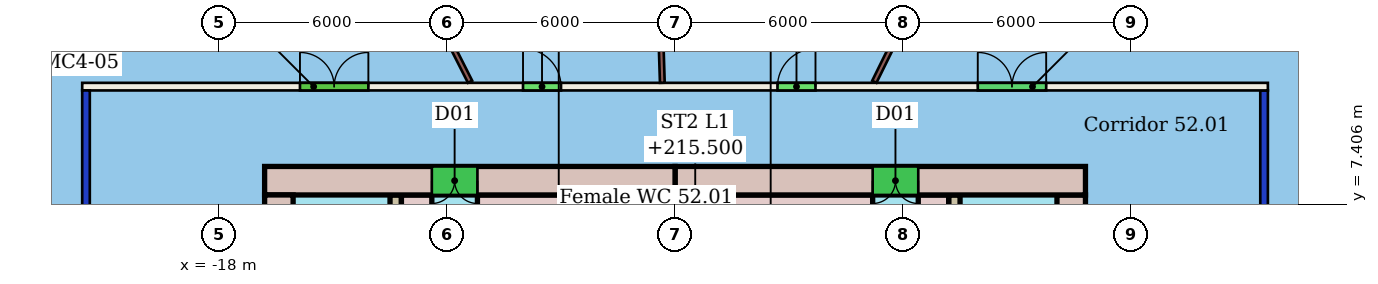
"""IFC4 building model, lengths in metres.
Left out: names, types, materials, properties, quantities, classifications, styles, units other than length and angle.
Written with IfcOpenShell. Run it as: python <this file> out.ifc"""

import sys

from ifc_helpers import new_model, si_unit, direction, frame, frame_2d, origin, place, context, subcontext, project, spatial, rectangle, extrude, element, fill, save


model = new_model("IFC4")
c1 = context("Model", 3, precision=1e-05, world=origin(), true_north=direction((0.0, 1.0)))
c2 = subcontext(c1, "Body", "Model", "MODEL_VIEW")
j1 = project(units=[si_unit("LENGTHUNIT", "METRE"), si_unit("PLANEANGLEUNIT", "RADIAN")], contexts=[c1])
p1 = place(None, origin())
s1 = spatial("IfcSite", under=j1, at=p1, CompositionType="ELEMENT")
p2 = place(p1, origin())
s2 = spatial("IfcBuilding", under=s1, at=p2, CompositionType="ELEMENT")
p3 = place(p2, frame((0.0, 0.0, 213.7)))
s3 = spatial("IfcBuildingStorey", under=s2, at=p3, CompositionType="ELEMENT", Elevation=213.7)
p4 = place(p3, frame((-21.5, -10.4, 0.0), z_axis=(0.0, 0.0, 1.0), x_axis=(0.0, 1.0, 0.0)))
e1 = element("IfcWall", 1, at=p4, inside=s3, PredefinedType="PARTITIONING", context=c2, shape_type="SweptSolid", body=[
    extrude(rectangle(XDim=20.8, YDim=0.2, at=frame_2d((10.4, 0.0))), origin(), (0.0, 0.0, 1.0), 3.05),
])
p5 = place(p4, frame((6.094, 0.0, 0.0)))
e2 = element("IfcOpeningElement", 2, at=p5, cuts=e1, PredefinedType="OPENING", context=c2, shape_type="SweptSolid", body=[
    extrude(rectangle(XDim=1.8, YDim=2.1, at=frame_2d((0.9, 1.05))), frame((0.0, 0.11, 0.0), z_axis=(0.0, -1.0, 0.0), x_axis=(1.0, 0.0, 0.0)), (0.0, 0.0, 1.0), 0.22),
])
p6 = place(p3, frame((-21.6, 10.5, 0.0), z_axis=(0.0, 0.0, 1.0), x_axis=(1.0, 0.0, 0.0)))
e3 = element("IfcWall", 3, at=p6, inside=s3, PredefinedType="PARTITIONING", context=c2, shape_type="SweptSolid", body=[
    extrude(rectangle(XDim=31.2, YDim=0.2, at=frame_2d((15.6, 0.0))), origin(), (0.0, 0.0, 1.0), 3.45),
])
p7 = place(p6, frame((18.296, 0.0, 0.0)))
e4 = element("IfcOpeningElement", 4, at=p7, cuts=e3, PredefinedType="OPENING", context=c2, shape_type="SweptSolid", body=[
    extrude(rectangle(XDim=1.0, YDim=2.4, at=frame_2d((0.5, 1.2))), frame((0.0, 0.11, 0.0), z_axis=(0.0, -1.0, 0.0), x_axis=(1.0, 0.0, 0.0)), (0.0, 0.0, 1.0), 0.22),
])
p8 = place(p6, frame((11.6, 0.0, 0.0)))
e5 = element("IfcOpeningElement", 5, at=p8, cuts=e3, PredefinedType="OPENING", context=c2, shape_type="SweptSolid", body=[
    extrude(rectangle(XDim=1.0, YDim=2.4, at=frame_2d((0.5, 1.2))), frame((0.0, 0.11, 0.0), z_axis=(0.0, -1.0, 0.0), x_axis=(1.0, 0.0, 0.0)), (0.0, 0.0, 1.0), 0.22),
])
p9 = place(p6, frame((5.73, 0.0, 0.0)))
e6 = element("IfcOpeningElement", 6, at=p9, cuts=e3, PredefinedType="OPENING", context=c2, shape_type="SweptSolid", body=[
    extrude(rectangle(XDim=1.8, YDim=2.4, at=frame_2d((0.9, 1.2))), frame((0.0, 0.11, 0.0), z_axis=(0.0, -1.0, 0.0), x_axis=(1.0, 0.0, 0.0)), (0.0, 0.0, 1.0), 0.22),
])
p10 = place(p6, frame((23.566, 0.0, 0.0)))
e7 = element("IfcOpeningElement", 7, at=p10, cuts=e3, PredefinedType="OPENING", context=c2, shape_type="SweptSolid", body=[
    extrude(rectangle(XDim=1.8, YDim=2.1, at=frame_2d((0.9, 1.05))), frame((0.0, 0.11, 0.0), z_axis=(0.0, -1.0, 0.0), x_axis=(1.0, 0.0, 0.0)), (0.0, 0.0, 1.0), 0.22),
])
p11 = place(p3, frame((9.5, 10.4, 0.0), z_axis=(0.0, 0.0, 1.0), x_axis=(0.0, -1.0, 0.0)))
e8 = element("IfcWall", 8, at=p11, inside=s3, PredefinedType="PARTITIONING", context=c2, shape_type="SweptSolid", body=[
    extrude(rectangle(XDim=20.8, YDim=0.2, at=frame_2d((10.4, 0.0))), origin(), (0.0, 0.0, 1.0), 3.05),
])
p12 = place(p11, frame((17.01, 0.0, 0.0)))
e9 = element("IfcOpeningElement", 9, at=p12, cuts=e8, PredefinedType="OPENING", context=c2, shape_type="SweptSolid", body=[
    extrude(rectangle(XDim=1.0, YDim=2.4, at=frame_2d((0.5, 1.2))), frame((0.0, 0.11, 0.0), z_axis=(0.0, -1.0, 0.0), x_axis=(1.0, 0.0, 0.0)), (0.0, 0.0, 1.0), 0.22),
])
p13 = place(p11, frame((11.015, 0.0, 0.0)))
e10 = element("IfcOpeningElement", 10, at=p13, cuts=e8, PredefinedType="OPENING", context=c2, shape_type="SweptSolid", body=[
    extrude(rectangle(XDim=1.5, YDim=2.1, at=frame_2d((0.75, 1.05))), frame((0.0, 0.11, 0.0), z_axis=(0.0, -1.0, 0.0), x_axis=(1.0, 0.0, 0.0)), (0.0, 0.0, 1.0), 0.22),
])
p14 = place(p3, frame((5.603, 23.515, 0.0), z_axis=(0.0, 0.0, 1.0), x_axis=(-0.442477794817, -0.896779460678, 0.0)))
e11 = element("IfcWall", 11, at=p14, inside=s3, PredefinedType="PARTITIONING", context=c2, shape_type="SweptSolid", body=[
    extrude(rectangle(XDim=14.371, YDim=0.125, at=frame_2d((7.186, 0.0))), origin(), (0.0, 0.0, 1.0), 3.45),
])
p15 = place(p3, frame((-6.754, 23.892, 0.0), z_axis=(0.0, 0.0, 1.0), x_axis=(0.031543712499, -0.999502373285, 0.0)))
e12 = element("IfcWall", 12, at=p15, inside=s3, PredefinedType="PARTITIONING", context=c2, shape_type="SweptSolid", body=[
    extrude(rectangle(XDim=13.297, YDim=0.125, at=frame_2d((6.648, 0.0))), origin(), (0.0, 0.0, 1.0), 3.45),
])
p16 = place(p3, frame((-16.099, 19.903, 0.0), z_axis=(0.0, 0.0, 1.0), x_axis=(0.452483019346, -0.891773018881, 0.0)))
e13 = element("IfcWall", 13, at=p16, inside=s3, PredefinedType="PARTITIONING", context=c2, shape_type="SweptSolid", body=[
    extrude(rectangle(XDim=10.4, YDim=0.125, at=frame_2d((5.2, 0.0))), origin(), (0.0, 0.0, 1.0), 3.45),
])
p17 = place(p3, frame((18.197, 8.789, 0.0), z_axis=(0.0, 0.0, 1.0), x_axis=(-0.939914460754, -0.341410026896, 0.0)))
e14 = element("IfcWall", 14, at=p17, inside=s3, PredefinedType="PARTITIONING", context=c2, shape_type="SweptSolid", body=[
    extrude(rectangle(XDim=9.124, YDim=0.125, at=frame_2d((4.562, 0.0))), origin(), (0.0, 0.0, 1.0), 3.45),
])
p18 = place(p3, frame((4.8, 8.025, 0.0), z_axis=(0.0, 0.0, 1.0), x_axis=(-1.0, 0.0, 0.0)))
e15 = element("IfcWall", 15, at=p18, inside=s3, PredefinedType="SHEAR", context=c2, shape_type="SweptSolid", body=[
    extrude(rectangle(XDim=10.8, YDim=0.75, at=frame_2d((5.4, 0.0))), origin(), (0.0, 0.0, 1.0), 3.3),
])
p19 = place(p18, frame((4.4, 0.0, 0.0)))
e16 = element("IfcOpeningElement", 16, at=p19, cuts=e15, PredefinedType="OPENING", context=c2, shape_type="SweptSolid", body=[
    extrude(rectangle(XDim=1.2, YDim=2.1, at=frame_2d((0.6, 1.05))), frame((0.0, 0.385, 0.0), z_axis=(0.0, -1.0, 0.0), x_axis=(1.0, 0.0, 0.0)), (0.0, 0.0, 1.0), 0.77),
])
p20 = place(p3, frame((-6.0, 8.025, 0.0), z_axis=(0.0, 0.0, 1.0), x_axis=(-1.0, 0.0, 0.0)))
e17 = element("IfcWall", 17, at=p20, inside=s3, PredefinedType="SHEAR", context=c2, shape_type="SweptSolid", body=[
    extrude(rectangle(XDim=10.8, YDim=0.75, at=frame_2d((5.4, 0.0))), origin(), (0.0, 0.0, 1.0), 3.3),
])
p21 = place(p20, frame((5.2, 0.0, 0.0)))
e18 = element("IfcOpeningElement", 18, at=p21, cuts=e17, PredefinedType="OPENING", context=c2, shape_type="SweptSolid", body=[
    extrude(rectangle(XDim=1.2, YDim=2.1, at=frame_2d((0.6, 1.05))), frame((0.0, 0.385, 0.0), z_axis=(0.0, -1.0, 0.0), x_axis=(1.0, 0.0, 0.0)), (0.0, 0.0, 1.0), 0.77),
])
p22 = place(p3, frame((-16.425, 7.65, 0.0), z_axis=(0.0, 0.0, 1.0), x_axis=(0.0, -1.0, 0.0)))
e19 = element("IfcWall", 19, at=p22, inside=s3, PredefinedType="SHEAR", context=c2, shape_type="SweptSolid", body=[
    extrude(rectangle(XDim=15.3, YDim=0.75, at=frame_2d((7.65, 0.0))), origin(), (0.0, 0.0, 1.0), 3.3),
])
p23 = place(p22, frame((11.25, 0.0, 0.0)))
e20 = element("IfcOpeningElement", 20, at=p23, cuts=e19, PredefinedType="OPENING", context=c2, shape_type="SweptSolid", body=[
    extrude(rectangle(XDim=1.2, YDim=2.1, at=frame_2d((0.6, 1.05))), frame((0.0, 0.385, 0.0), z_axis=(0.0, -1.0, 0.0), x_axis=(1.0, 0.0, 0.0)), (0.0, 0.0, 1.0), 0.77),
])
p24 = place(p22, frame((2.85, 0.0, 0.0)))
e21 = element("IfcOpeningElement", 21, at=p24, cuts=e19, PredefinedType="OPENING", context=c2, shape_type="SweptSolid", body=[
    extrude(rectangle(XDim=1.2, YDim=2.1, at=frame_2d((0.6, 1.05))), frame((0.0, 0.385, 0.0), z_axis=(0.0, -1.0, 0.0), x_axis=(1.0, 0.0, 0.0)), (0.0, 0.0, 1.0), 0.77),
])
p25 = place(p3, frame((4.425, -7.65, 0.0), z_axis=(0.0, 0.0, 1.0), x_axis=(0.0, 1.0, 0.0)))
e22 = element("IfcWall", 22, at=p25, inside=s3, PredefinedType="SHEAR", context=c2, shape_type="SweptSolid", body=[
    extrude(rectangle(XDim=15.3, YDim=0.75, at=frame_2d((7.65, 0.0))), origin(), (0.0, 0.0, 1.0), 3.3),
])
p26 = place(p25, frame((2.85, 0.0, 0.0)))
e23 = element("IfcOpeningElement", 23, at=p26, cuts=e22, PredefinedType="OPENING", context=c2, shape_type="SweptSolid", body=[
    extrude(rectangle(XDim=1.2, YDim=2.1, at=frame_2d((0.6, 1.05))), frame((0.0, 0.385, 0.0), z_axis=(0.0, -1.0, 0.0), x_axis=(1.0, 0.0, 0.0)), (0.0, 0.0, 1.0), 0.77),
])
p27 = place(p25, frame((11.25, 0.0, 0.0)))
e24 = element("IfcOpeningElement", 24, at=p27, cuts=e22, PredefinedType="OPENING", context=c2, shape_type="SweptSolid", body=[
    extrude(rectangle(XDim=1.2, YDim=2.1, at=frame_2d((0.6, 1.05))), frame((0.0, 0.385, 0.0), z_axis=(0.0, -1.0, 0.0), x_axis=(1.0, 0.0, 0.0)), (0.0, 0.0, 1.0), 0.77),
])
p28 = place(p3, frame((-13.35, 7.65, 0.0), z_axis=(0.0, 0.0, 1.0), x_axis=(0.0, -1.0, 0.0)))
e25 = element("IfcWall", 25, at=p28, inside=s3, PredefinedType="SHEAR", context=c2, shape_type="SweptSolid", body=[
    extrude(rectangle(XDim=15.3, YDim=0.3, at=frame_2d((7.65, 0.0))), origin(), (0.0, 0.0, 1.0), 3.3),
])
p29 = place(p28, frame((6.9, 0.0, 0.0)))
e26 = element("IfcOpeningElement", 26, at=p29, cuts=e25, PredefinedType="OPENING", context=c2, shape_type="SweptSolid", body=[
    extrude(rectangle(XDim=1.5, YDim=2.1, at=frame_2d((0.75, 1.05))), frame((0.0, 0.16, 0.0), z_axis=(0.0, -1.0, 0.0), x_axis=(1.0, 0.0, 0.0)), (0.0, 0.0, 1.0), 0.32),
])
p30 = place(p3, frame((1.35, -7.65, 0.0), z_axis=(0.0, 0.0, 1.0), x_axis=(0.0, 1.0, 0.0)))
e27 = element("IfcWall", 27, at=p30, inside=s3, PredefinedType="SHEAR", context=c2, shape_type="SweptSolid", body=[
    extrude(rectangle(XDim=15.3, YDim=0.3, at=frame_2d((7.65, 0.0))), origin(), (0.0, 0.0, 1.0), 3.3),
])
p31 = place(p30, frame((1.56, 0.0, 0.0)))
e28 = element("IfcOpeningElement", 28, at=p31, cuts=e27, PredefinedType="OPENING", context=c2, shape_type="SweptSolid", body=[
    extrude(rectangle(XDim=1.0, YDim=2.1, at=frame_2d((0.5, 1.05))), frame((0.0, 0.16, 0.0), z_axis=(0.0, -1.0, 0.0), x_axis=(1.0, 0.0, 0.0)), (0.0, 0.0, 1.0), 0.32),
])
p32 = place(p30, frame((6.9, 0.0, 0.0)))
e29 = element("IfcOpeningElement", 29, at=p32, cuts=e27, PredefinedType="OPENING", context=c2, shape_type="SweptSolid", body=[
    extrude(rectangle(XDim=1.5, YDim=2.1, at=frame_2d((0.75, 1.05))), frame((0.0, 0.16, 0.0), z_axis=(0.0, -1.0, 0.0), x_axis=(1.0, 0.0, 0.0)), (0.0, 0.0, 1.0), 0.32),
])
p33 = place(p3, frame((-6.0, 3.88, 0.0), z_axis=(0.0, 0.0, 1.0), x_axis=(0.0, 1.0, 0.0)))
e30 = element("IfcWall", 30, at=p33, inside=s3, PredefinedType="SHEAR", context=c2, shape_type="SweptSolid", body=[
    extrude(rectangle(XDim=3.77, YDim=0.3, at=frame_2d((1.885, 0.0))), origin(), (0.0, 0.0, 1.0), 3.3),
])
p34 = place(p3, frame((-13.2, 7.475, 0.0), z_axis=(0.0, 0.0, 1.0), x_axis=(1.0, 0.0, 0.0)))
e31 = element("IfcWall", 31, at=p34, inside=s3, PredefinedType="SHEAR", context=c2, shape_type="SweptSolid", body=[
    extrude(rectangle(XDim=0.8, YDim=0.35, at=frame_2d((0.4, 0.0))), origin(), (0.0, 0.0, 1.0), 3.3),
])
for number, where, z_axis, x_axis in (
    (32, (-11.2, 7.475, 0.0), (0.0, 0.0, 1.0), (1.0, 0.0, 0.0)),
    (33, (-5.85, 7.475, 0.0), (0.0, 0.0, 1.0), (1.0, 0.0, 0.0)),
):
    element("IfcWall", number, at=place(p3, frame(where, z_axis=z_axis, x_axis=x_axis)), inside=s3, PredefinedType="SHEAR", context=c2, shape_type="SweptSolid", body=[
        extrude(rectangle(XDim=5.05, YDim=0.35, at=frame_2d((2.525, 0.0))), origin(), (0.0, 0.0, 1.0), 3.3),
    ])
p35 = place(p3, frame((0.4, 7.475, 0.0), z_axis=(0.0, 0.0, 1.0), x_axis=(1.0, 0.0, 0.0)))
e34 = element("IfcWall", 34, at=p35, inside=s3, PredefinedType="SHEAR", context=c2, shape_type="SweptSolid", body=[
    extrude(rectangle(XDim=0.8, YDim=0.35, at=frame_2d((0.4, 0.0))), origin(), (0.0, 0.0, 1.0), 3.3),
])
p36 = place(p7, origin())
e35 = element("IfcDoor", 35, at=p36, inside=s3, OperationType="SINGLE_SWING_RIGHT", PredefinedType="DOOR", context=c2, shape_type="SweptSolid", body=[
    extrude(rectangle(XDim=1.0, YDim=2.4, at=frame_2d((0.5, 1.2))), frame((0.0, 0.025, 0.0), z_axis=(0.0, -1.0, 0.0), x_axis=(1.0, 0.0, 0.0)), (0.0, 0.0, 1.0), 0.05),
])
fill(e4, e35)
p37 = place(p8, origin())
e36 = element("IfcDoor", 36, at=p37, inside=s3, OperationType="SINGLE_SWING_LEFT", PredefinedType="DOOR", context=c2, shape_type="SweptSolid", body=[
    extrude(rectangle(XDim=1.0, YDim=2.4, at=frame_2d((0.5, 1.2))), frame((0.0, 0.025, 0.0), z_axis=(0.0, -1.0, 0.0), x_axis=(1.0, 0.0, 0.0)), (0.0, 0.0, 1.0), 0.05),
])
fill(e5, e36)
p38 = place(p9, origin())
e37 = element("IfcDoor", 37, at=p38, inside=s3, OperationType="DOUBLE_DOOR_SINGLE_SWING", PredefinedType="DOOR", context=c2, shape_type="SweptSolid", body=[
    extrude(rectangle(XDim=1.8, YDim=2.4, at=frame_2d((0.9, 1.2))), frame((0.0, 0.025, 0.0), z_axis=(0.0, -1.0, 0.0), x_axis=(1.0, 0.0, 0.0)), (0.0, 0.0, 1.0), 0.05),
])
fill(e6, e37)
p39 = place(p10, origin())
e38 = element("IfcDoor", 38, at=p39, inside=s3, OperationType="DOUBLE_DOOR_SINGLE_SWING", PredefinedType="DOOR", context=c2, shape_type="SweptSolid", body=[
    extrude(rectangle(XDim=1.8, YDim=2.1, at=frame_2d((0.9, 1.05))), frame((0.0, 0.025, 0.0), z_axis=(0.0, -1.0, 0.0), x_axis=(1.0, 0.0, 0.0)), (0.0, 0.0, 1.0), 0.05),
])
fill(e7, e38)
p40 = place(p19, origin())
e39 = element("IfcDoor", 39, at=p40, inside=s3, OperationType="DOUBLE_DOOR_SINGLE_SWING", PredefinedType="NOTDEFINED", context=c2, shape_type="SweptSolid", body=[
    extrude(rectangle(XDim=1.2, YDim=2.1, at=frame_2d((0.6, 1.05))), frame((0.0, 0.025, 0.0), z_axis=(0.0, -1.0, 0.0), x_axis=(1.0, 0.0, 0.0)), (0.0, 0.0, 1.0), 0.05),
])
fill(e16, e39)
p41 = place(p21, origin())
e40 = element("IfcDoor", 40, at=p41, inside=s3, OperationType="DOUBLE_DOOR_SINGLE_SWING", PredefinedType="NOTDEFINED", context=c2, shape_type="SweptSolid", body=[
    extrude(rectangle(XDim=1.2, YDim=2.1, at=frame_2d((0.6, 1.05))), frame((0.0, 0.025, 0.0), z_axis=(0.0, -1.0, 0.0), x_axis=(1.0, 0.0, 0.0)), (0.0, 0.0, 1.0), 0.05),
])
fill(e18, e40)
save(model, sys.argv[1])
